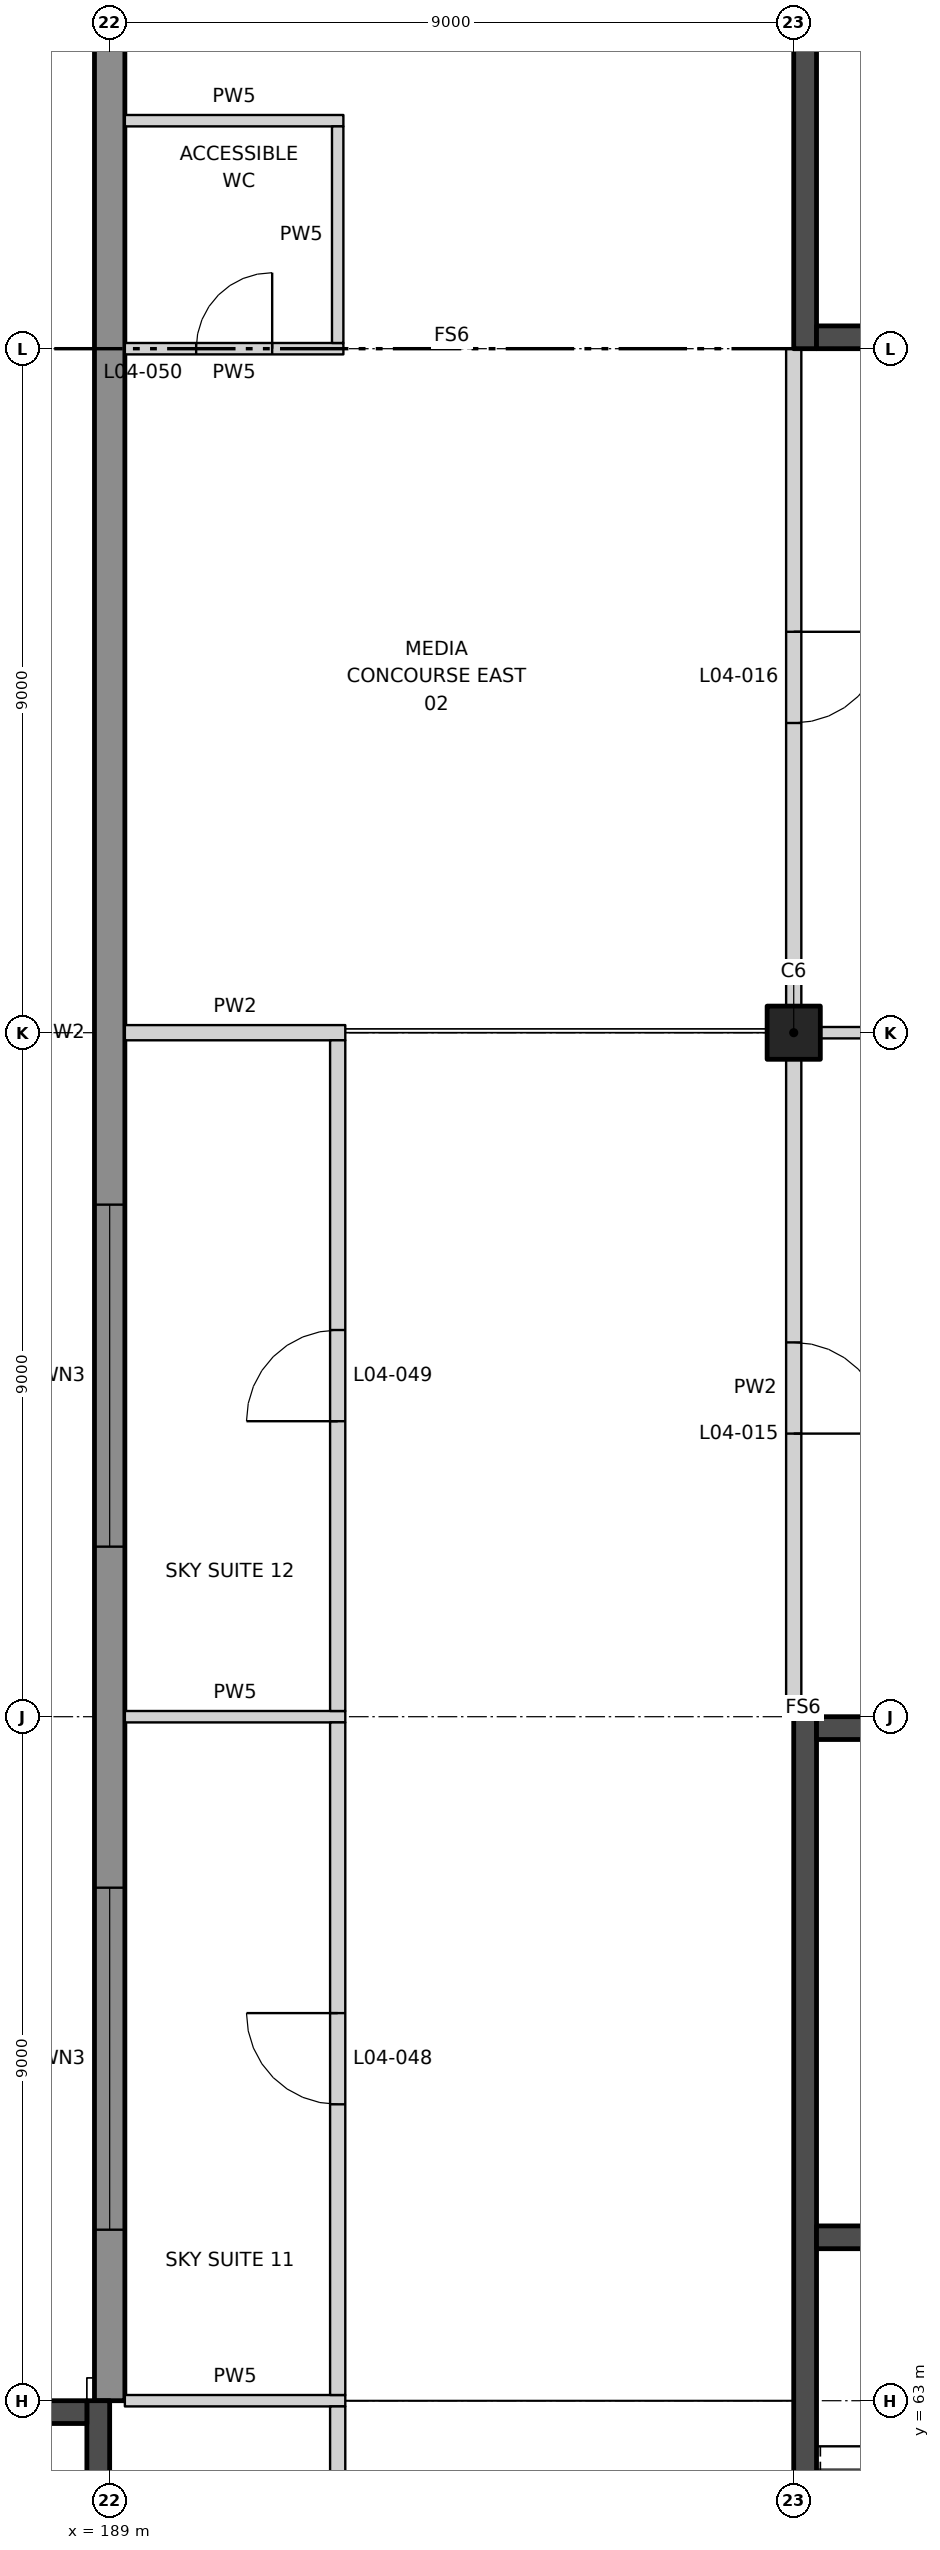
"""IFC4 building model, lengths in metres.
Left out: names, types, materials, properties, quantities, classifications, styles, units other than length and angle.
Written with IfcOpenShell. Run it as: python <this file> out.ifc"""

import sys

from ifc_helpers import new_model, si_unit, direction, frame, frame_2d, origin, origin_2d, place, context, subcontext, project, spatial, rectangle, extrude, element, fill, save


model = new_model("IFC4")
c1 = context("Model", 3, precision=1e-05, world=origin(), true_north=direction((0.0, 1.0)))
c2 = subcontext(c1, "Body", "Model", "MODEL_VIEW")
j1 = project(units=[si_unit("LENGTHUNIT", "METRE"), si_unit("PLANEANGLEUNIT", "RADIAN")], contexts=[c1])
p1 = place(None, origin())
s1 = spatial("IfcSite", under=j1, at=p1, CompositionType="ELEMENT")
p2 = place(p1, origin())
s2 = spatial("IfcBuilding", under=s1, at=p2, CompositionType="ELEMENT")
p3 = place(p2, frame((0.0, 0.0, 28.0)))
s3 = spatial("IfcBuildingStorey", under=s2, at=p3, CompositionType="ELEMENT", Elevation=28.0)
p4 = place(p3, frame((198.0, 81.0, 0.0), z_axis=(0.0, 0.0, 1.0), x_axis=(1.0, 0.0, 0.0)))
e1 = element("IfcColumn", 1, at=p4, inside=s3, PredefinedType="COLUMN", context=c2, shape_type="SweptSolid", body=[
    extrude(rectangle(XDim=0.7, YDim=0.7, at=origin_2d()), origin(), (0.0, 0.0, 1.0), 5.5),
])
p5 = place(p3, frame((189.0, 63.0, 0.0), z_axis=(0.0, 0.0, 1.0), x_axis=(0.0, 1.0, 0.0)))
e2 = element("IfcWall", 2, at=p5, inside=s3, PredefinedType="SOLIDWALL", context=c2, shape_type="SweptSolid", body=[
    extrude(rectangle(XDim=36.0, YDim=0.4, at=frame_2d((18.0, 0.0))), origin(), (0.0, 0.0, 1.0), 5.5),
])
p6 = place(p5, frame((2.25, 0.0, 0.9)))
e3 = element("IfcOpeningElement", 3, at=p6, cuts=e2, PredefinedType="OPENING", context=c2, shape_type="SweptSolid", body=[
    extrude(rectangle(XDim=4.5, YDim=1.8, at=frame_2d((2.25, 0.9))), frame((0.0, 0.21, 0.0), z_axis=(0.0, -1.0, 0.0), x_axis=(1.0, 0.0, 0.0)), (0.0, 0.0, 1.0), 0.42),
])
p7 = place(p5, frame((11.238, 0.0, 0.9)))
e4 = element("IfcOpeningElement", 4, at=p7, cuts=e2, PredefinedType="OPENING", context=c2, shape_type="SweptSolid", body=[
    extrude(rectangle(XDim=4.5, YDim=1.8, at=frame_2d((2.25, 0.9))), frame((0.0, 0.21, 0.0), z_axis=(0.0, -1.0, 0.0), x_axis=(1.0, 0.0, 0.0)), (0.0, 0.0, 1.0), 0.42),
])
for number, where, z_axis, x_axis in (
    (5, (189.2, 63.0, 0.0), (0.0, 0.0, 1.0), (1.0, 0.0, 0.0)),
    (6, (189.2, 72.0, 0.0), (0.0, 0.0, 1.0), (1.0, 0.0, 0.0)),
):
    element("IfcWall", number, at=place(p3, frame(where, z_axis=z_axis, x_axis=x_axis)), inside=s3, PredefinedType="PARTITIONING", context=c2, shape_type="SweptSolid", body=[
        extrude(rectangle(XDim=2.9, YDim=0.15, at=frame_2d((1.45, 0.0))), origin(), (0.0, 0.0, 1.0), 4.2),
    ])
p8 = place(p3, frame((189.2, 81.0, 0.0), z_axis=(0.0, 0.0, 1.0), x_axis=(1.0, 0.0, 0.0)))
e7 = element("IfcWall", 7, at=p8, inside=s3, PredefinedType="PARTITIONING", context=c2, shape_type="SweptSolid", body=[
    extrude(rectangle(XDim=2.9, YDim=0.2, at=frame_2d((1.45, 0.0))), origin(), (0.0, 0.0, 1.0), 4.2),
])
p9 = place(p3, frame((198.35, 81.0, 0.0), z_axis=(0.0, 0.0, 1.0), x_axis=(1.0, 0.0, 0.0)))
e8 = element("IfcWall", 8, at=p9, inside=s3, PredefinedType="PARTITIONING", context=c2, shape_type="SweptSolid", body=[
    extrude(rectangle(XDim=8.25, YDim=0.15, at=frame_2d((4.125, 0.0))), origin(), (0.0, 0.0, 1.0), 9.5),
])
p10 = place(p3, frame((189.2, 90.0, 0.0), z_axis=(0.0, 0.0, 1.0), x_axis=(1.0, 0.0, 0.0)))
e9 = element("IfcWall", 9, at=p10, inside=s3, PredefinedType="PARTITIONING", context=c2, shape_type="SweptSolid", body=[
    extrude(rectangle(XDim=2.875, YDim=0.15, at=frame_2d((1.438, 0.0))), origin(), (0.0, 0.0, 1.0), 4.2),
])
p11 = place(p10, frame((0.938, 0.0, 0.0)))
e10 = element("IfcOpeningElement", 10, at=p11, cuts=e9, PredefinedType="OPENING", context=c2, shape_type="SweptSolid", body=[
    extrude(rectangle(XDim=1.0, YDim=2.1, at=frame_2d((0.5, 1.05))), frame((0.0, 0.085, 0.0), z_axis=(0.0, -1.0, 0.0), x_axis=(1.0, 0.0, 0.0)), (0.0, 0.0, 1.0), 0.17),
])
p12 = place(p3, frame((189.2, 93.0, 0.0), z_axis=(0.0, 0.0, 1.0), x_axis=(1.0, 0.0, 0.0)))
e11 = element("IfcWall", 11, at=p12, inside=s3, PredefinedType="PARTITIONING", context=c2, shape_type="SweptSolid", body=[
    extrude(rectangle(XDim=2.875, YDim=0.15, at=frame_2d((1.438, 0.0))), origin(), (0.0, 0.0, 1.0), 5.5),
])
p13 = place(p3, frame((192.0, 54.075, 0.0), z_axis=(0.0, 0.0, 1.0), x_axis=(0.0, 1.0, 0.0)))
e12 = element("IfcWall", 12, at=p13, inside=s3, PredefinedType="PARTITIONING", context=c2, shape_type="SweptSolid", body=[
    extrude(rectangle(XDim=8.85, YDim=0.2, at=frame_2d((4.425, 0.0))), origin(), (0.0, 0.0, 1.0), 5.5),
])
p14 = place(p13, frame((3.825, 0.0, 0.0)))
e13 = element("IfcOpeningElement", 13, at=p14, cuts=e12, PredefinedType="OPENING", context=c2, shape_type="SweptSolid", body=[
    extrude(rectangle(XDim=1.2, YDim=2.1, at=frame_2d((0.6, 1.05))), frame((0.0, 0.11, 0.0), z_axis=(0.0, -1.0, 0.0), x_axis=(1.0, 0.0, 0.0)), (0.0, 0.0, 1.0), 0.22),
])
p15 = place(p3, frame((192.0, 63.075, 0.0), z_axis=(0.0, 0.0, 1.0), x_axis=(0.0, 1.0, 0.0)))
e14 = element("IfcWall", 14, at=p15, inside=s3, PredefinedType="PARTITIONING", context=c2, shape_type="SweptSolid", body=[
    extrude(rectangle(XDim=8.85, YDim=0.2, at=frame_2d((4.425, 0.0))), origin(), (0.0, 0.0, 1.0), 5.5),
])
p16 = place(p15, frame((3.825, 0.0, 0.0)))
e15 = element("IfcOpeningElement", 15, at=p16, cuts=e14, PredefinedType="OPENING", context=c2, shape_type="SweptSolid", body=[
    extrude(rectangle(XDim=1.2, YDim=2.1, at=frame_2d((0.6, 1.05))), frame((0.0, 0.11, 0.0), z_axis=(0.0, -1.0, 0.0), x_axis=(1.0, 0.0, 0.0)), (0.0, 0.0, 1.0), 0.22),
])
p17 = place(p3, frame((192.0, 72.075, 0.0), z_axis=(0.0, 0.0, 1.0), x_axis=(0.0, 1.0, 0.0)))
e16 = element("IfcWall", 16, at=p17, inside=s3, PredefinedType="PARTITIONING", context=c2, shape_type="SweptSolid", body=[
    extrude(rectangle(XDim=8.825, YDim=0.2, at=frame_2d((4.413, 0.0))), origin(), (0.0, 0.0, 1.0), 5.5),
])
p18 = place(p17, frame((3.813, 0.0, 0.0)))
e17 = element("IfcOpeningElement", 17, at=p18, cuts=e16, PredefinedType="OPENING", context=c2, shape_type="SweptSolid", body=[
    extrude(rectangle(XDim=1.2, YDim=2.1, at=frame_2d((0.6, 1.05))), frame((0.0, 0.11, 0.0), z_axis=(0.0, -1.0, 0.0), x_axis=(1.0, 0.0, 0.0)), (0.0, 0.0, 1.0), 0.22),
])
p19 = place(p3, frame((192.0, 90.075, 0.0), z_axis=(0.0, 0.0, 1.0), x_axis=(0.0, 1.0, 0.0)))
e18 = element("IfcWall", 18, at=p19, inside=s3, PredefinedType="PARTITIONING", context=c2, shape_type="SweptSolid", body=[
    extrude(rectangle(XDim=2.85, YDim=0.15, at=frame_2d((1.425, 0.0))), origin(), (0.0, 0.0, 1.0), 5.5),
])
p20 = place(p3, frame((198.0, 72.0, 0.0), z_axis=(0.0, 0.0, 1.0), x_axis=(0.0, 1.0, 0.0)))
e19 = element("IfcWall", 19, at=p20, inside=s3, PredefinedType="PARTITIONING", context=c2, shape_type="SweptSolid", body=[
    extrude(rectangle(XDim=8.65, YDim=0.2, at=frame_2d((4.325, 0.0))), origin(), (0.0, 0.0, 1.0), 3.8),
])
p21 = place(p20, frame((3.725, 0.0, 0.0)))
e20 = element("IfcOpeningElement", 20, at=p21, cuts=e19, PredefinedType="OPENING", context=c2, shape_type="SweptSolid", body=[
    extrude(rectangle(XDim=1.2, YDim=2.1, at=frame_2d((0.6, 1.05))), frame((0.0, 0.11, 0.0), z_axis=(0.0, -1.0, 0.0), x_axis=(1.0, 0.0, 0.0)), (0.0, 0.0, 1.0), 0.22),
])
p22 = place(p3, frame((198.0, 81.35, 0.0), z_axis=(0.0, 0.0, 1.0), x_axis=(0.0, 1.0, 0.0)))
e21 = element("IfcWall", 21, at=p22, inside=s3, PredefinedType="PARTITIONING", context=c2, shape_type="SweptSolid", body=[
    extrude(rectangle(XDim=8.65, YDim=0.2, at=frame_2d((4.325, 0.0))), origin(), (0.0, 0.0, 1.0), 4.2),
])
p23 = place(p22, frame((3.725, 0.0, 0.0)))
e22 = element("IfcOpeningElement", 22, at=p23, cuts=e21, PredefinedType="OPENING", context=c2, shape_type="SweptSolid", body=[
    extrude(rectangle(XDim=1.2, YDim=2.1, at=frame_2d((0.6, 1.05))), frame((0.0, 0.11, 0.0), z_axis=(0.0, -1.0, 0.0), x_axis=(1.0, 0.0, 0.0)), (0.0, 0.0, 1.0), 0.22),
])
p24 = place(p3, frame((198.15, 54.0, 0.0), z_axis=(0.0, 0.0, 1.0), x_axis=(0.0, 1.0, 0.0)))
e23 = element("IfcWall", 23, at=p24, inside=s3, PredefinedType="SHEAR", context=c2, shape_type="SweptSolid", body=[
    extrude(rectangle(XDim=18.0, YDim=0.3, at=frame_2d((9.0, 0.0))), origin(), (0.0, 0.0, 1.0), 5.5),
])
p25 = place(p24, frame((1.5, 0.0, 0.0)))
e24 = element("IfcOpeningElement", 24, at=p25, cuts=e23, PredefinedType="OPENING", context=c2, shape_type="SweptSolid", body=[
    extrude(rectangle(XDim=1.2, YDim=2.1, at=frame_2d((0.6, 1.05))), frame((0.0, 0.16, 0.0), z_axis=(0.0, -1.0, 0.0), x_axis=(1.0, 0.0, 0.0)), (0.0, 0.0, 1.0), 0.32),
])
for number, where, z_axis, x_axis in (
    (25, (198.3, 71.85, 0.0), (0.0, 0.0, 1.0), (1.0, 0.0, 0.0)),
    (26, (198.3, 65.15, 0.0), (0.0, 0.0, 1.0), (1.0, 0.0, 0.0)),
):
    element("IfcWall", number, at=place(p3, frame(where, z_axis=z_axis, x_axis=x_axis)), inside=s3, PredefinedType="SHEAR", context=c2, shape_type="SweptSolid", body=[
        extrude(rectangle(XDim=8.4, YDim=0.3, at=frame_2d((4.2, 0.0))), origin(), (0.0, 0.0, 1.0), 5.5),
    ])
p26 = place(p3, frame((198.15, 108.0, 0.0), z_axis=(0.0, 0.0, 1.0), x_axis=(0.0, -1.0, 0.0)))
e27 = element("IfcWall", 27, at=p26, inside=s3, PredefinedType="SHEAR", context=c2, shape_type="SweptSolid", body=[
    extrude(rectangle(XDim=18.0, YDim=0.3, at=frame_2d((9.0, 0.0))), origin(), (0.0, 0.0, 1.0), 5.5),
])
p27 = place(p26, frame((1.5, 0.0, 0.0)))
e28 = element("IfcOpeningElement", 28, at=p27, cuts=e27, PredefinedType="OPENING", context=c2, shape_type="SweptSolid", body=[
    extrude(rectangle(XDim=1.2, YDim=2.1, at=frame_2d((0.6, 1.05))), frame((0.0, 0.16, 0.0), z_axis=(0.0, -1.0, 0.0), x_axis=(1.0, 0.0, 0.0)), (0.0, 0.0, 1.0), 0.32),
])
p28 = place(p3, frame((198.3, 90.15, 0.0), z_axis=(0.0, 0.0, 1.0), x_axis=(1.0, 0.0, 0.0)))
e29 = element("IfcWall", 29, at=p28, inside=s3, PredefinedType="SHEAR", context=c2, shape_type="SweptSolid", body=[
    extrude(rectangle(XDim=8.4, YDim=0.3, at=frame_2d((4.2, 0.0))), origin(), (0.0, 0.0, 1.0), 5.5),
])
p29 = place(p3, frame((188.85, 63.0, 0.0), z_axis=(0.0, 0.0, 1.0), x_axis=(0.0, -1.0, 0.0)))
e30 = element("IfcWall", 30, at=p29, inside=s3, PredefinedType="SHEAR", context=c2, shape_type="SweptSolid", body=[
    extrude(rectangle(XDim=18.0, YDim=0.3, at=frame_2d((9.0, 0.0))), origin(), (0.0, 0.0, 1.0), 5.5),
])
p30 = place(p3, frame((180.3, 62.85, 0.0), z_axis=(0.0, 0.0, 1.0), x_axis=(1.0, 0.0, 0.0)))
e31 = element("IfcWall", 31, at=p30, inside=s3, PredefinedType="SHEAR", context=c2, shape_type="SweptSolid", body=[
    extrude(rectangle(XDim=8.4, YDim=0.3, at=frame_2d((4.2, 0.0))), origin(), (0.0, 0.0, 1.0), 5.5),
])
p31 = place(p21, frame((1.2, 0.0, 0.0), z_axis=(0.0, 0.0, 1.0), x_axis=(-1.0, 0.0, 0.0)))
e32 = element("IfcDoor", 32, at=p31, inside=s3, OperationType="SINGLE_SWING_RIGHT", PredefinedType="DOOR", context=c2, shape_type="SweptSolid", body=[
    extrude(rectangle(XDim=1.2, YDim=2.1, at=frame_2d((0.6, 1.05))), frame((0.0, 0.025, 0.0), z_axis=(0.0, -1.0, 0.0), x_axis=(1.0, 0.0, 0.0)), (0.0, 0.0, 1.0), 0.05),
])
fill(e20, e32)
p32 = place(p23, frame((1.2, 0.0, 0.0), z_axis=(0.0, 0.0, 1.0), x_axis=(-1.0, 0.0, 0.0)))
e33 = element("IfcDoor", 33, at=p32, inside=s3, OperationType="SINGLE_SWING_LEFT", PredefinedType="DOOR", context=c2, shape_type="SweptSolid", body=[
    extrude(rectangle(XDim=1.2, YDim=2.1, at=frame_2d((0.6, 1.05))), frame((0.0, 0.025, 0.0), z_axis=(0.0, -1.0, 0.0), x_axis=(1.0, 0.0, 0.0)), (0.0, 0.0, 1.0), 0.05),
])
fill(e22, e33)
p33 = place(p16, origin())
e34 = element("IfcDoor", 34, at=p33, inside=s3, OperationType="SINGLE_SWING_RIGHT", PredefinedType="DOOR", context=c2, shape_type="SweptSolid", body=[
    extrude(rectangle(XDim=1.2, YDim=2.1, at=frame_2d((0.6, 1.05))), frame((0.0, 0.025, 0.0), z_axis=(0.0, -1.0, 0.0), x_axis=(1.0, 0.0, 0.0)), (0.0, 0.0, 1.0), 0.05),
])
fill(e15, e34)
p34 = place(p18, origin())
e35 = element("IfcDoor", 35, at=p34, inside=s3, OperationType="SINGLE_SWING_LEFT", PredefinedType="DOOR", context=c2, shape_type="SweptSolid", body=[
    extrude(rectangle(XDim=1.2, YDim=2.1, at=frame_2d((0.6, 1.05))), frame((0.0, 0.025, 0.0), z_axis=(0.0, -1.0, 0.0), x_axis=(1.0, 0.0, 0.0)), (0.0, 0.0, 1.0), 0.05),
])
fill(e17, e35)
p35 = place(p11, origin())
e36 = element("IfcDoor", 36, at=p35, inside=s3, OperationType="SINGLE_SWING_RIGHT", PredefinedType="DOOR", context=c2, shape_type="SweptSolid", body=[
    extrude(rectangle(XDim=1.0, YDim=2.1, at=frame_2d((0.5, 1.05))), frame((0.0, 0.025, 0.0), z_axis=(0.0, -1.0, 0.0), x_axis=(1.0, 0.0, 0.0)), (0.0, 0.0, 1.0), 0.05),
])
fill(e10, e36)
p36 = place(p6, origin())
e37 = element("IfcWindow", 37, at=p36, inside=s3, PartitioningType="SINGLE_PANEL", PredefinedType="WINDOW", context=c2, shape_type="SweptSolid", body=[
    extrude(rectangle(XDim=4.5, YDim=1.8, at=frame_2d((2.25, 0.9))), frame((0.0, 0.03, 0.0), z_axis=(0.0, -1.0, 0.0), x_axis=(1.0, 0.0, 0.0)), (0.0, 0.0, 1.0), 0.06),
])
fill(e3, e37)
p37 = place(p7, origin())
e38 = element("IfcWindow", 38, at=p37, inside=s3, PartitioningType="SINGLE_PANEL", PredefinedType="WINDOW", context=c2, shape_type="SweptSolid", body=[
    extrude(rectangle(XDim=4.5, YDim=1.8, at=frame_2d((2.25, 0.9))), frame((0.0, 0.03, 0.0), z_axis=(0.0, -1.0, 0.0), x_axis=(1.0, 0.0, 0.0)), (0.0, 0.0, 1.0), 0.06),
])
fill(e4, e38)
save(model, sys.argv[1])
